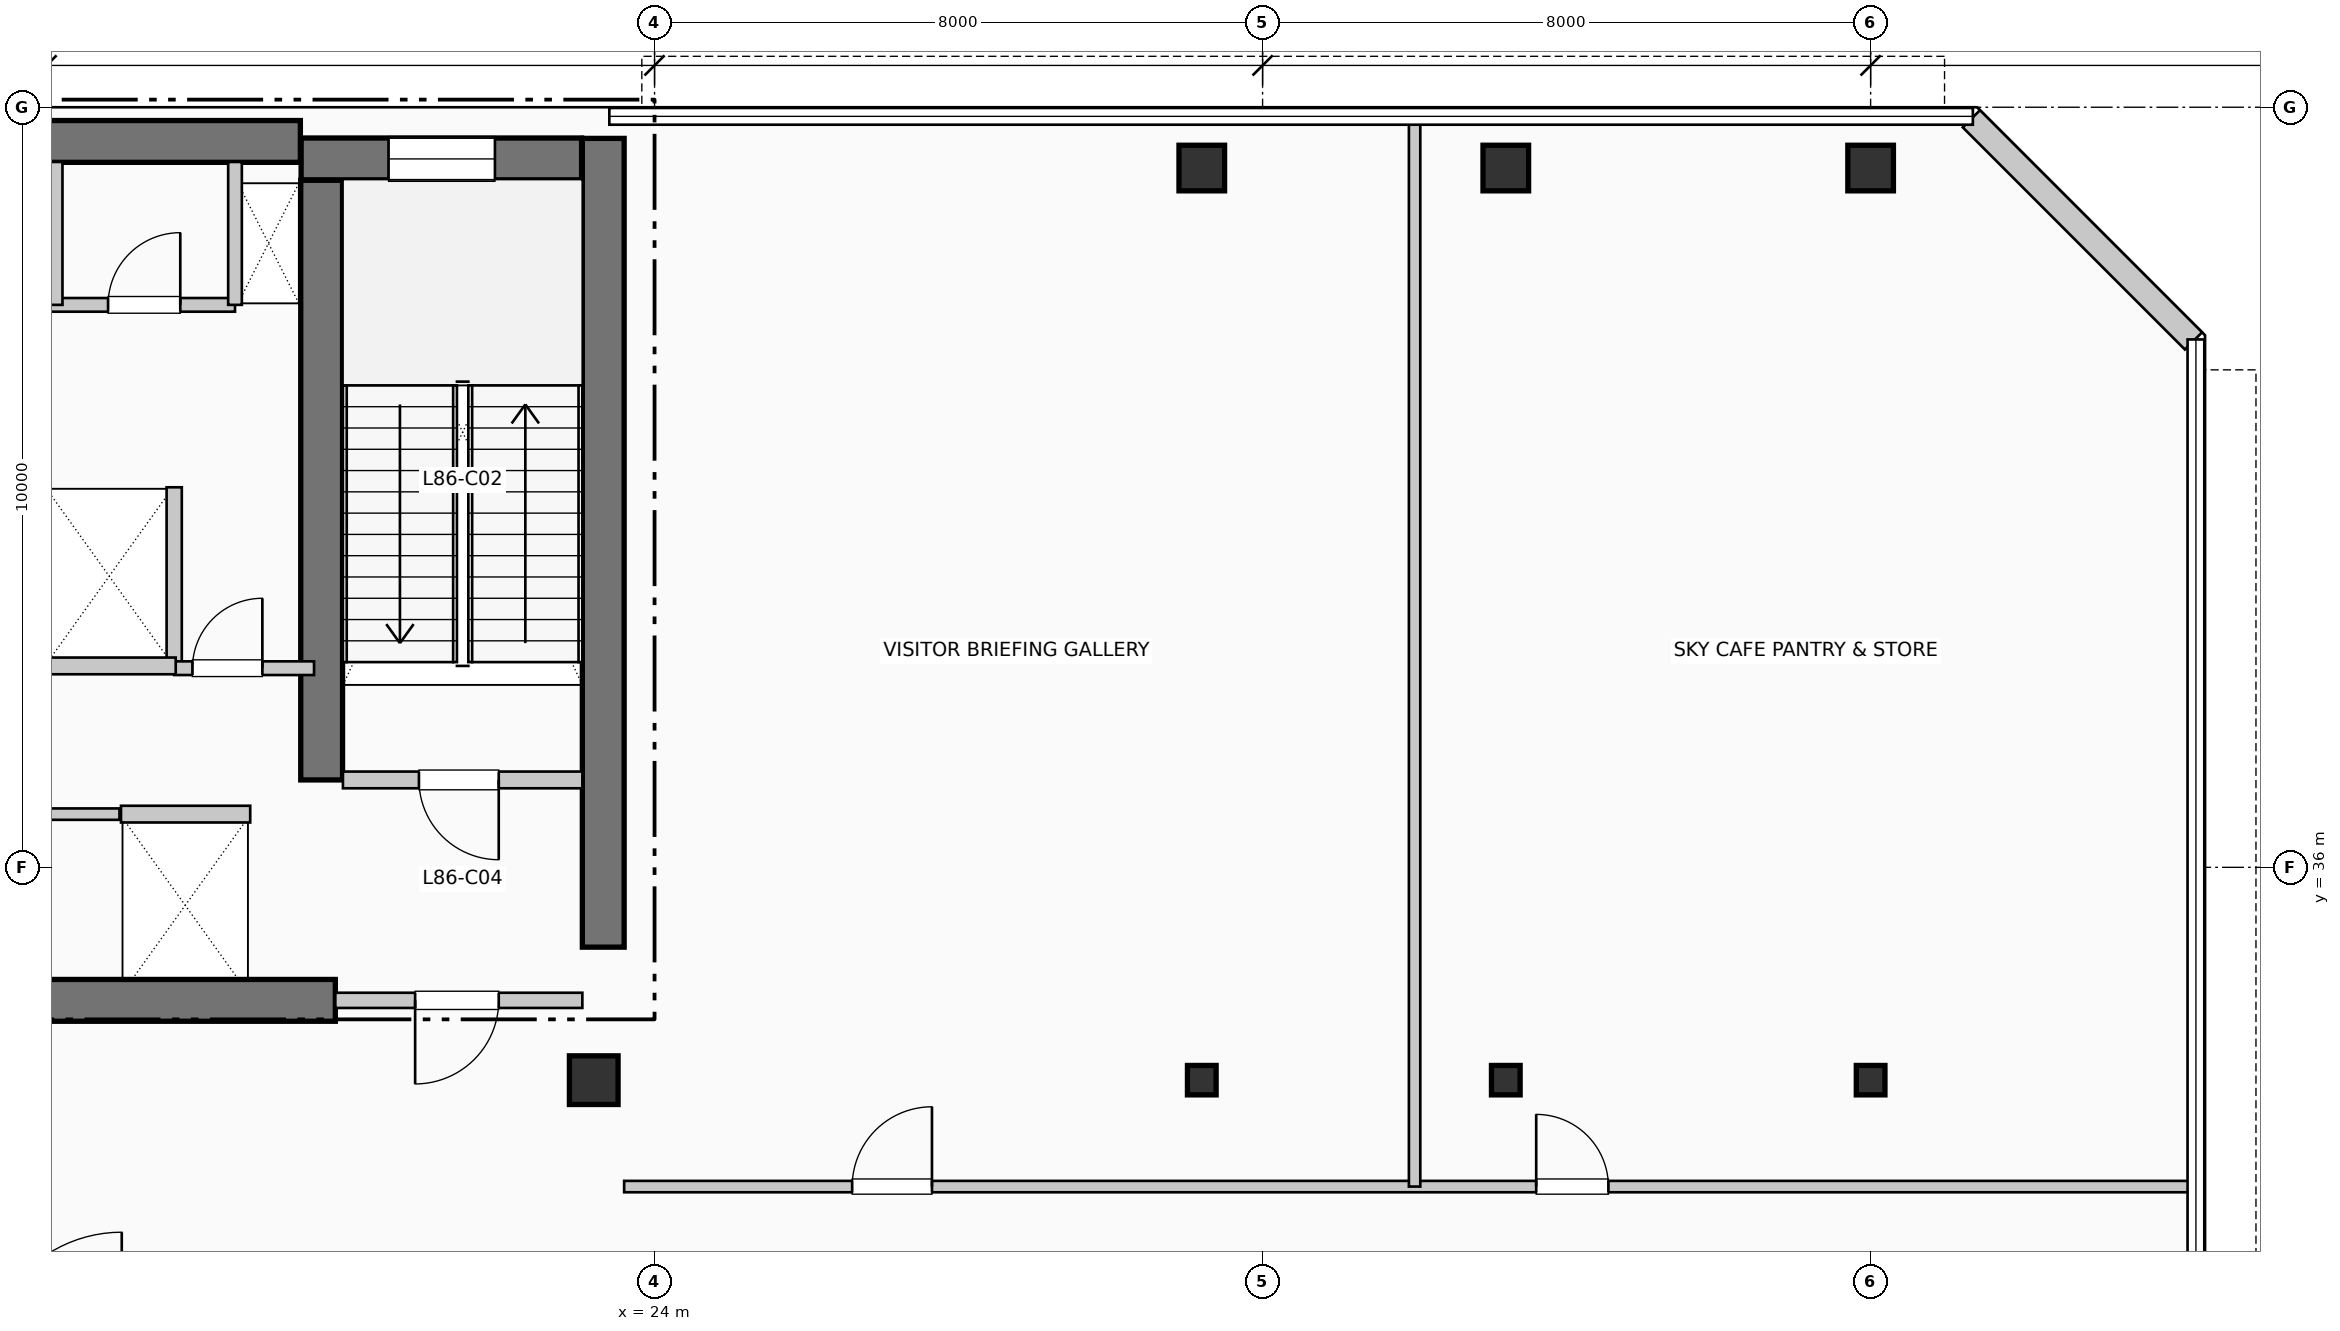
"""IFC4 building model, lengths in metres.
Left out: names, types, materials, properties, quantities, classifications, styles, units other than length and angle.
Written with IfcOpenShell. Run it as: python <this file> out.ifc"""

import sys

from ifc_helpers import new_model, si_unit, direction, frame, frame_2d, origin, origin_2d, place, context, subcontext, project, spatial, rectangle, i_section, extrude, element, fill, save


model = new_model("IFC4")
c1 = context("Model", 3, precision=1e-05, world=origin(), true_north=direction((0.0, 1.0)))
c2 = subcontext(c1, "Body", "Model", "MODEL_VIEW")
j1 = project(units=[si_unit("LENGTHUNIT", "METRE"), si_unit("PLANEANGLEUNIT", "RADIAN")], contexts=[c1])
p1 = place(None, origin())
s1 = spatial("IfcSite", under=j1, at=p1, CompositionType="ELEMENT")
p2 = place(p1, origin())
s2 = spatial("IfcBuilding", under=s1, at=p2, CompositionType="ELEMENT")
p3 = place(p2, frame((0.0, 0.0, 352.11)))
s3 = spatial("IfcBuildingStorey", under=s2, at=p3, CompositionType="ELEMENT", Elevation=352.11)
p4 = place(p3, frame((5.36, 45.55, 0.0), z_axis=(0.0, 0.0, 1.0), x_axis=(1.0, 0.0, 0.0)))
e1 = element("IfcWall", 1, at=p4, inside=s3, PredefinedType="SHEAR", context=c2, shape_type="SweptSolid", body=[
    extrude(rectangle(XDim=13.98, YDim=0.55, at=frame_2d((6.99, 0.0))), origin(), (0.0, 0.0, 1.0), 4.62),
])
p5 = place(p3, frame((23.325, 34.95, 0.0), z_axis=(0.0, 0.0, 1.0), x_axis=(0.0, 1.0, 0.0)))
e2 = element("IfcWall", 2, at=p5, inside=s3, PredefinedType="SHEAR", context=c2, shape_type="SweptSolid", body=[
    extrude(rectangle(XDim=10.64, YDim=0.55, at=frame_2d((5.32, 0.0))), origin(), (0.0, 0.0, 1.0), 4.62),
])
p6 = place(p3, frame((13.68, 34.25, 0.0), z_axis=(0.0, 0.0, 1.0), x_axis=(1.0, 0.0, 0.0)))
e3 = element("IfcWall", 3, at=p6, inside=s3, PredefinedType="SHEAR", context=c2, shape_type="SweptSolid", body=[
    extrude(rectangle(XDim=6.12, YDim=0.55, at=frame_2d((3.06, 0.0))), origin(), (0.0, 0.0, 1.0), 4.62),
])
p7 = place(p3, frame((19.62, 37.15, 0.0), z_axis=(0.0, 0.0, 1.0), x_axis=(0.0, 1.0, 0.0)))
e4 = element("IfcWall", 4, at=p7, inside=s3, PredefinedType="SHEAR", context=c2, shape_type="SweptSolid", body=[
    extrude(rectangle(XDim=7.89, YDim=0.55, at=frame_2d((3.945, 0.0))), origin(), (0.0, 0.0, 1.0), 4.62),
])
p8 = place(p3, frame((19.35, 45.32, 0.0), z_axis=(0.0, 0.0, 1.0), x_axis=(1.0, 0.0, 0.0)))
e5 = element("IfcWall", 5, at=p8, inside=s3, PredefinedType="SHEAR", context=c2, shape_type="SweptSolid", body=[
    extrude(rectangle(XDim=3.69, YDim=0.55, at=frame_2d((1.845, 0.0))), origin(), (0.0, 0.0, 1.0), 4.62),
])
p9 = place(p8, frame((1.15, 0.0, 1.05)))
e6 = element("IfcOpeningElement", 6, at=p9, cuts=e5, PredefinedType="OPENING", context=c2, shape_type="SweptSolid", body=[
    extrude(rectangle(XDim=1.4, YDim=1.8, at=frame_2d((0.7, 0.9))), frame((0.0, 0.285, 0.0), z_axis=(0.0, -1.0, 0.0), x_axis=(1.0, 0.0, 0.0)), (0.0, 0.0, 1.0), 0.57),
])
p10 = place(p3, frame((23.2, 33.2, 0.0), z_axis=(0.0, 0.0, 1.0), x_axis=(1.0, 0.0, 0.0)))
e7 = element("IfcColumn", 7, at=p10, inside=s3, PredefinedType="COLUMN", context=c2, shape_type="SweptSolid", body=[
    extrude(rectangle(XDim=0.64, YDim=0.64, at=origin_2d()), origin(), (0.0, 0.0, 1.0), 4.62),
])
p11 = place(p3, frame((31.2, 33.2, 0.0), z_axis=(0.0, 0.0, 1.0), x_axis=(1.0, 0.0, 0.0)))
e8 = element("IfcColumn", 8, at=p11, inside=s3, PredefinedType="COLUMN", context=c2, shape_type="SweptSolid", body=[
    extrude(i_section(OverallWidth=0.377, OverallDepth=0.387, WebThickness=0.016, FlangeThickness=0.027, at=origin_2d()), origin(), (0.0, 0.0, 1.0), 4.62),
])
p12 = place(p3, frame((31.2, 45.2, 0.0), z_axis=(0.0, 0.0, 1.0), x_axis=(1.0, 0.0, 0.0)))
e9 = element("IfcColumn", 9, at=p12, inside=s3, PredefinedType="COLUMN", context=c2, shape_type="SweptSolid", body=[
    extrude(rectangle(XDim=0.6, YDim=0.6, at=origin_2d()), origin(), (0.0, 0.0, 1.0), 4.62),
])
p13 = place(p3, frame((35.2, 33.2, 0.0), z_axis=(0.0, 0.0, 1.0), x_axis=(1.0, 0.0, 0.0)))
e10 = element("IfcColumn", 10, at=p13, inside=s3, PredefinedType="COLUMN", context=c2, shape_type="SweptSolid", body=[
    extrude(i_section(OverallWidth=0.377, OverallDepth=0.387, WebThickness=0.016, FlangeThickness=0.027, at=origin_2d()), origin(), (0.0, 0.0, 1.0), 4.62),
])
p14 = place(p3, frame((35.2, 45.2, 0.0), z_axis=(0.0, 0.0, 1.0), x_axis=(1.0, 0.0, 0.0)))
e11 = element("IfcColumn", 11, at=p14, inside=s3, PredefinedType="COLUMN", context=c2, shape_type="SweptSolid", body=[
    extrude(rectangle(XDim=0.6, YDim=0.6, at=origin_2d()), origin(), (0.0, 0.0, 1.0), 4.62),
])
p15 = place(p3, frame((40.0, 33.2, 0.0), z_axis=(0.0, 0.0, 1.0), x_axis=(1.0, 0.0, 0.0)))
e12 = element("IfcColumn", 12, at=p15, inside=s3, PredefinedType="COLUMN", context=c2, shape_type="SweptSolid", body=[
    extrude(i_section(OverallWidth=0.377, OverallDepth=0.387, WebThickness=0.016, FlangeThickness=0.027, at=origin_2d()), origin(), (0.0, 0.0, 1.0), 4.62),
])
p16 = place(p3, frame((40.0, 45.2, 0.0), z_axis=(0.0, 0.0, 1.0), x_axis=(1.0, 0.0, 0.0)))
e13 = element("IfcColumn", 13, at=p16, inside=s3, PredefinedType="COLUMN", context=c2, shape_type="SweptSolid", body=[
    extrude(rectangle(XDim=0.6, YDim=0.6, at=origin_2d()), origin(), (0.0, 0.0, 1.0), 4.62),
])
p17 = place(p3, frame((44.248, 42.926, 0.0), z_axis=(0.0, 0.0, 1.0), x_axis=(-0.707136318428, 0.707077242712, 0.0)))
e14 = element("IfcWall", 14, at=p17, inside=s3, PredefinedType="SOLIDWALL", context=c2, shape_type="SweptSolid", body=[
    extrude(rectangle(XDim=4.133, YDim=0.32, at=frame_2d((2.066, 0.0))), origin(), (0.0, 0.0, 1.0), 4.37),
])
p18 = place(p3, frame((19.9, 37.15, 0.0), z_axis=(0.0, 0.0, 1.0), x_axis=(1.0, 0.0, 0.0)))
e15 = element("IfcWall", 15, at=p18, inside=s3, PredefinedType="PARTITIONING", context=c2, shape_type="SweptSolid", body=[
    extrude(rectangle(XDim=3.15, YDim=0.22, at=frame_2d((1.575, 0.0))), origin(), (0.0, 0.0, 1.0), 4.37),
])
p19 = place(p18, frame((2.05, 0.0, 0.0), z_axis=(0.0, 0.0, 1.0), x_axis=(-1.0, 0.0, 0.0)))
e16 = element("IfcOpeningElement", 16, at=p19, cuts=e15, PredefinedType="OPENING", context=c2, shape_type="SweptSolid", body=[
    extrude(rectangle(XDim=1.05, YDim=2.15, at=frame_2d((0.525, 1.075))), frame((0.0, 0.12, 0.0), z_axis=(0.0, -1.0, 0.0), x_axis=(1.0, 0.0, 0.0)), (0.0, 0.0, 1.0), 0.24),
])
p20 = place(p3, frame((19.8, 34.25, 0.0), z_axis=(0.0, 0.0, 1.0), x_axis=(1.0, 0.0, 0.0)))
e17 = element("IfcWall", 17, at=p20, inside=s3, PredefinedType="PARTITIONING", context=c2, shape_type="SweptSolid", body=[
    extrude(rectangle(XDim=3.25, YDim=0.2, at=frame_2d((1.625, 0.0))), origin(), (0.0, 0.0, 1.0), 4.37),
])
p21 = place(p20, frame((2.15, 0.0, 0.0), z_axis=(0.0, 0.0, 1.0), x_axis=(-1.0, 0.0, 0.0)))
e18 = element("IfcOpeningElement", 18, at=p21, cuts=e17, PredefinedType="OPENING", context=c2, shape_type="SweptSolid", body=[
    extrude(rectangle(XDim=1.1, YDim=2.15, at=frame_2d((0.55, 1.075))), frame((0.0, 0.11, 0.0), z_axis=(0.0, -1.0, 0.0), x_axis=(1.0, 0.0, 0.0)), (0.0, 0.0, 1.0), 0.22),
])
p22 = place(p3, frame((17.68, 38.65, 0.0), z_axis=(0.0, 0.0, 1.0), x_axis=(0.0, 1.0, 0.0)))
e19 = element("IfcWall", 19, at=p22, inside=s3, PredefinedType="PARTITIONING", context=c2, shape_type="SweptSolid", body=[
    extrude(rectangle(XDim=2.35, YDim=0.2, at=frame_2d((1.175, 0.0))), origin(), (0.0, 0.0, 1.0), 4.37),
])
p23 = place(p3, frame((17.68, 38.62, 0.0), z_axis=(0.0, 0.0, 1.0), x_axis=(1.0, 0.0, 0.0)))
e20 = element("IfcWall", 20, at=p23, inside=s3, PredefinedType="PARTITIONING", context=c2, shape_type="SweptSolid", body=[
    extrude(rectangle(XDim=1.84, YDim=0.18, at=frame_2d((0.92, 0.0))), origin(), (0.0, 0.0, 1.0), 4.37),
])
p24 = place(p23, frame((0.24, 0.0, 0.0)))
e21 = element("IfcOpeningElement", 21, at=p24, cuts=e20, PredefinedType="OPENING", context=c2, shape_type="SweptSolid", body=[
    extrude(rectangle(XDim=0.92, YDim=2.1, at=frame_2d((0.46, 1.05))), frame((0.0, 0.1, 0.0), z_axis=(0.0, -1.0, 0.0), x_axis=(1.0, 0.0, 0.0)), (0.0, 0.0, 1.0), 0.2),
])
p25 = place(p3, frame((13.68, 36.7, 0.0), z_axis=(0.0, 0.0, 1.0), x_axis=(1.0, 0.0, 0.0)))
e22 = element("IfcWall", 22, at=p25, inside=s3, PredefinedType="PARTITIONING", context=c2, shape_type="SweptSolid", body=[
    extrude(rectangle(XDim=3.28, YDim=0.15, at=frame_2d((1.64, 0.0))), origin(), (0.0, 0.0, 1.0), 4.37),
])
p26 = place(p25, frame((1.15, 0.0, 0.0)))
e23 = element("IfcOpeningElement", 23, at=p26, cuts=e22, PredefinedType="OPENING", context=c2, shape_type="SweptSolid", body=[
    extrude(rectangle(XDim=0.95, YDim=2.15, at=frame_2d((0.475, 1.075))), frame((0.0, 0.085, 0.0), z_axis=(0.0, -1.0, 0.0), x_axis=(1.0, 0.0, 0.0)), (0.0, 0.0, 1.0), 0.17),
])
p27 = place(p3, frame((16.98, 36.7, 0.0), z_axis=(0.0, 0.0, 1.0), x_axis=(1.0, 0.0, 0.0)))
e24 = element("IfcWall", 24, at=p27, inside=s3, PredefinedType="PARTITIONING", context=c2, shape_type="SweptSolid", body=[
    extrude(rectangle(XDim=1.7, YDim=0.22, at=frame_2d((0.85, 0.0))), origin(), (0.0, 0.0, 1.0), 4.37),
])
p28 = place(p3, frame((15.98, 38.65, 0.0), z_axis=(0.0, 0.0, 1.0), x_axis=(1.0, 0.0, 0.0)))
e25 = element("IfcWall", 25, at=p28, inside=s3, PredefinedType="PARTITIONING", context=c2, shape_type="SweptSolid", body=[
    extrude(rectangle(XDim=1.72, YDim=0.22, at=frame_2d((0.86, 0.0))), origin(), (0.0, 0.0, 1.0), 4.37),
])
p29 = place(p3, frame((9.15, 43.4, 0.0), z_axis=(0.0, 0.0, 1.0), x_axis=(1.0, 0.0, 0.0)))
e26 = element("IfcWall", 26, at=p29, inside=s3, PredefinedType="PLUMBINGWALL", context=c2, shape_type="SweptSolid", body=[
    extrude(rectangle(XDim=9.33, YDim=0.18, at=frame_2d((4.665, 0.0))), origin(), (0.0, 0.0, 1.0), 4.37),
])
p30 = place(p29, frame((0.72, 0.0, 0.0)))
e27 = element("IfcOpeningElement", 27, at=p30, cuts=e26, PredefinedType="OPENING", context=c2, shape_type="SweptSolid", body=[
    extrude(rectangle(XDim=0.92, YDim=2.1, at=frame_2d((0.46, 1.05))), frame((0.0, 0.1, 0.0), z_axis=(0.0, -1.0, 0.0), x_axis=(1.0, 0.0, 0.0)), (0.0, 0.0, 1.0), 0.2),
])
p31 = place(p29, frame((3.02, 0.0, 0.0)))
e28 = element("IfcOpeningElement", 28, at=p31, cuts=e26, PredefinedType="OPENING", context=c2, shape_type="SweptSolid", body=[
    extrude(rectangle(XDim=0.92, YDim=2.1, at=frame_2d((0.46, 1.05))), frame((0.0, 0.1, 0.0), z_axis=(0.0, -1.0, 0.0), x_axis=(1.0, 0.0, 0.0)), (0.0, 0.0, 1.0), 0.2),
])
p32 = place(p29, frame((5.34, 0.0, 0.0)))
e29 = element("IfcOpeningElement", 29, at=p32, cuts=e26, PredefinedType="OPENING", context=c2, shape_type="SweptSolid", body=[
    extrude(rectangle(XDim=0.92, YDim=2.1, at=frame_2d((0.46, 1.05))), frame((0.0, 0.1, 0.0), z_axis=(0.0, -1.0, 0.0), x_axis=(1.0, 0.0, 0.0)), (0.0, 0.0, 1.0), 0.2),
])
p33 = place(p29, frame((7.66, 0.0, 0.0)))
e30 = element("IfcOpeningElement", 30, at=p33, cuts=e26, PredefinedType="OPENING", context=c2, shape_type="SweptSolid", body=[
    extrude(rectangle(XDim=0.95, YDim=2.1, at=frame_2d((0.475, 1.05))), frame((0.0, 0.1, 0.0), z_axis=(0.0, -1.0, 0.0), x_axis=(1.0, 0.0, 0.0)), (0.0, 0.0, 1.0), 0.2),
])
for number, where, z_axis, x_axis in (
    (31, (18.48, 43.4, 0.0), (0.0, 0.0, 1.0), (0.0, 1.0, 0.0)),
    (32, (16.12, 43.4, 0.0), (0.0, 0.0, 1.0), (0.0, 1.0, 0.0)),
):
    element("IfcWall", number, at=place(p3, frame(where, z_axis=z_axis, x_axis=x_axis)), inside=s3, PredefinedType="PLUMBINGWALL", context=c2, shape_type="SweptSolid", body=[
        extrude(rectangle(XDim=1.88, YDim=0.18, at=frame_2d((0.94, 0.0))), origin(), (0.0, 0.0, 1.0), 4.37),
    ])
p34 = place(p3, frame((23.6, 31.8, 0.0), z_axis=(0.0, 0.0, 1.0), x_axis=(1.0, 0.0, 0.0)))
e33 = element("IfcWall", 33, at=p34, inside=s3, PredefinedType="PARTITIONING", context=c2, shape_type="SweptSolid", body=[
    extrude(rectangle(XDim=20.61, YDim=0.15, at=frame_2d((10.305, 0.0))), origin(), (0.0, 0.0, 1.0), 4.37),
])
p35 = place(p34, frame((3.0, 0.0, 0.0)))
e34 = element("IfcOpeningElement", 34, at=p35, cuts=e33, PredefinedType="OPENING", context=c2, shape_type="SweptSolid", body=[
    extrude(rectangle(XDim=1.05, YDim=2.15, at=frame_2d((0.525, 1.075))), frame((0.0, 0.085, 0.0), z_axis=(0.0, -1.0, 0.0), x_axis=(1.0, 0.0, 0.0)), (0.0, 0.0, 1.0), 0.17),
])
p36 = place(p34, frame((12.0, 0.0, 0.0)))
e35 = element("IfcOpeningElement", 35, at=p36, cuts=e33, PredefinedType="OPENING", context=c2, shape_type="SweptSolid", body=[
    extrude(rectangle(XDim=0.95, YDim=2.15, at=frame_2d((0.475, 1.075))), frame((0.0, 0.085, 0.0), z_axis=(0.0, -1.0, 0.0), x_axis=(1.0, 0.0, 0.0)), (0.0, 0.0, 1.0), 0.17),
])
p37 = place(p3, frame((34.0, 31.8, 0.0), z_axis=(0.0, 0.0, 1.0), x_axis=(0.0, 1.0, 0.0)))
e36 = element("IfcWall", 36, at=p37, inside=s3, PredefinedType="PARTITIONING", context=c2, shape_type="SweptSolid", body=[
    extrude(rectangle(XDim=14.01, YDim=0.15, at=frame_2d((7.005, 0.0))), origin(), (0.0, 0.0, 1.0), 4.37),
])
p38 = place(p9, origin())
e37 = element("IfcWindow", 37, at=p38, inside=s3, PartitioningType="SINGLE_PANEL", PredefinedType="WINDOW", context=c2, shape_type="SweptSolid", body=[
    extrude(rectangle(XDim=1.4, YDim=1.8, at=frame_2d((0.7, 0.9))), frame((0.0, 0.03, 0.0), z_axis=(0.0, -1.0, 0.0), x_axis=(1.0, 0.0, 0.0)), (0.0, 0.0, 1.0), 0.06),
])
fill(e6, e37)
p39 = place(p19, origin())
e38 = element("IfcDoor", 38, at=p39, inside=s3, OperationType="SINGLE_SWING_RIGHT", PredefinedType="DOOR", context=c2, shape_type="SweptSolid", body=[
    extrude(rectangle(XDim=1.05, YDim=2.15, at=frame_2d((0.525, 1.075))), frame((0.0, 0.025, 0.0), z_axis=(0.0, -1.0, 0.0), x_axis=(1.0, 0.0, 0.0)), (0.0, 0.0, 1.0), 0.05),
])
fill(e16, e38)
p40 = place(p21, origin())
e39 = element("IfcDoor", 39, at=p40, inside=s3, OperationType="SINGLE_SWING_LEFT", PredefinedType="DOOR", context=c2, shape_type="SweptSolid", body=[
    extrude(rectangle(XDim=1.1, YDim=2.15, at=frame_2d((0.55, 1.075))), frame((0.0, 0.025, 0.0), z_axis=(0.0, -1.0, 0.0), x_axis=(1.0, 0.0, 0.0)), (0.0, 0.0, 1.0), 0.05),
])
fill(e18, e39)
p41 = place(p24, origin())
e40 = element("IfcDoor", 40, at=p41, inside=s3, OperationType="SINGLE_SWING_RIGHT", PredefinedType="DOOR", context=c2, shape_type="SweptSolid", body=[
    extrude(rectangle(XDim=0.92, YDim=2.1, at=frame_2d((0.46, 1.05))), frame((0.0, 0.025, 0.0), z_axis=(0.0, -1.0, 0.0), x_axis=(1.0, 0.0, 0.0)), (0.0, 0.0, 1.0), 0.05),
])
fill(e21, e40)
p42 = place(p33, origin())
e41 = element("IfcDoor", 41, at=p42, inside=s3, OperationType="SINGLE_SWING_RIGHT", PredefinedType="DOOR", context=c2, shape_type="SweptSolid", body=[
    extrude(rectangle(XDim=0.95, YDim=2.1, at=frame_2d((0.475, 1.05))), frame((0.0, 0.025, 0.0), z_axis=(0.0, -1.0, 0.0), x_axis=(1.0, 0.0, 0.0)), (0.0, 0.0, 1.0), 0.05),
])
fill(e30, e41)
p43 = place(p35, origin())
e42 = element("IfcDoor", 42, at=p43, inside=s3, OperationType="SINGLE_SWING_RIGHT", PredefinedType="DOOR", context=c2, shape_type="SweptSolid", body=[
    extrude(rectangle(XDim=1.05, YDim=2.15, at=frame_2d((0.525, 1.075))), frame((0.0, 0.025, 0.0), z_axis=(0.0, -1.0, 0.0), x_axis=(1.0, 0.0, 0.0)), (0.0, 0.0, 1.0), 0.05),
])
fill(e34, e42)
p44 = place(p36, origin())
e43 = element("IfcDoor", 43, at=p44, inside=s3, OperationType="SINGLE_SWING_LEFT", PredefinedType="DOOR", context=c2, shape_type="SweptSolid", body=[
    extrude(rectangle(XDim=0.95, YDim=2.15, at=frame_2d((0.475, 1.075))), frame((0.0, 0.025, 0.0), z_axis=(0.0, -1.0, 0.0), x_axis=(1.0, 0.0, 0.0)), (0.0, 0.0, 1.0), 0.05),
])
fill(e35, e43)
save(model, sys.argv[1])
